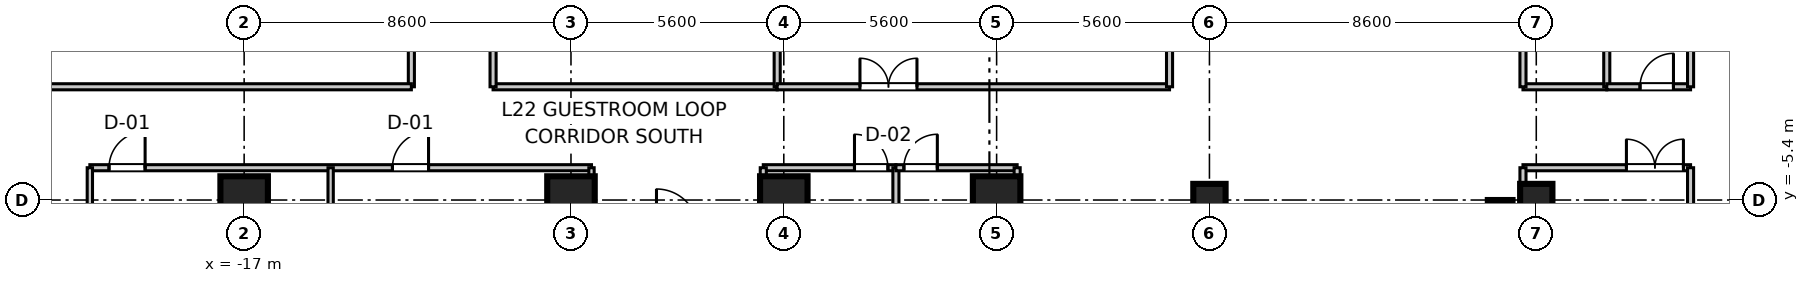
"""IFC4 building model, lengths in metres.
Left out: names, types, materials, properties, quantities, classifications, styles, units other than length and angle.
Written with IfcOpenShell. Run it as: python <this file> out.ifc"""

import sys

from ifc_helpers import new_model, si_unit, direction, frame, frame_2d, origin, origin_2d, place, context, subcontext, project, spatial, rectangle, extrude, source, transform, mapped, element, fill, save


model = new_model("IFC4")
c1 = context("Model", 3, precision=1e-05, world=origin(), true_north=direction((0.0, 1.0)))
c2 = subcontext(c1, "Body", "Model", "MODEL_VIEW")
j1 = project(units=[si_unit("LENGTHUNIT", "METRE"), si_unit("PLANEANGLEUNIT", "RADIAN")], contexts=[c1])
p1 = place(None, origin())
s1 = spatial("IfcSite", under=j1, at=p1, CompositionType="ELEMENT")
p2 = place(p1, origin())
s2 = spatial("IfcBuilding", under=s1, at=p2, CompositionType="ELEMENT")
p3 = place(p2, frame((0.0, 0.0, 91.95)))
s3 = spatial("IfcBuildingStorey", under=s2, at=p3, CompositionType="ELEMENT", Elevation=91.95)
m1 = source(origin(), c2, "Body", "SweptSolid", [
    extrude(rectangle(XDim=1.25, YDim=1.25, at=origin_2d()), origin(), (0.0, 0.0, 1.0), 3.605),
])
for number, where, z_axis, x_axis in (
    (1, (-17.0, -5.4, 0.0), (0.0, 0.0, 1.0), (1.0, 0.0, 0.0)),
    (2, (-8.4, -5.4, 0.0), (0.0, 0.0, 1.0), (1.0, 0.0, 0.0)),
    (3, (-2.8, -5.4, 0.0), (0.0, 0.0, 1.0), (1.0, 0.0, 0.0)),
    (4, (2.8, -5.4, 0.0), (0.0, 0.0, 1.0), (1.0, 0.0, 0.0)),
):
    element("IfcColumn", number, at=place(p3, frame(where, z_axis=z_axis, x_axis=x_axis)), inside=s3, PredefinedType="COLUMN", context=c2, shape_type="MappedRepresentation", body=[
        mapped(m1, transform((0.0, 0.0, 0.0), scale=1.0)),
    ])
m2 = source(origin(), c2, "Body", "SweptSolid", [
    extrude(rectangle(XDim=0.85, YDim=0.85, at=origin_2d()), origin(), (0.0, 0.0, 1.0), 3.605),
])
for number, where, z_axis, x_axis in (
    (5, (8.4, -5.4, 0.0), (0.0, 0.0, 1.0), (1.0, 0.0, 0.0)),
    (6, (17.0, -5.4, 0.0), (0.0, 0.0, 1.0), (1.0, 0.0, 0.0)),
):
    element("IfcColumn", number, at=place(p3, frame(where, z_axis=z_axis, x_axis=x_axis)), inside=s3, PredefinedType="PILASTER", context=c2, shape_type="MappedRepresentation", body=[
        mapped(m2, transform((0.0, 0.0, 0.0), scale=1.0)),
    ])
m3 = source(origin(), c2, "Body", "SweptSolid", [
    extrude(rectangle(XDim=11.6, YDim=0.65, at=frame_2d((5.8, 0.0))), origin(), (0.0, 0.0, 1.0), 3.38),
])
p4 = place(p3, frame((16.05, -17.0, 0.0), z_axis=(0.0, 0.0, 1.0), x_axis=(0.0, 1.0, 0.0)))
e7 = element("IfcWall", 7, at=p4, inside=s3, PredefinedType="SHEAR", context=c2, shape_type="MappedRepresentation", body=[
    mapped(m3, transform((0.0, 0.0, 0.0), scale=1.0)),
])
m4 = source(origin(), c2, "Body", "SweptSolid", [
    extrude(rectangle(XDim=4.41, YDim=0.16, at=frame_2d((2.205, 0.0))), origin(), (0.0, 0.0, 1.0), 2.72),
])
p5 = place(p3, frame((16.65, -4.55, 0.0), z_axis=(0.0, 0.0, 1.0), x_axis=(1.0, 0.0, 0.0)))
e8 = element("IfcWall", 8, at=p5, inside=s3, PredefinedType="PARTITIONING", context=c2, shape_type="MappedRepresentation", body=[
    mapped(m4, transform((0.0, 0.0, 0.0), scale=1.0)),
])
p6 = place(p5, frame((2.722, 0.0, 0.0)))
e9 = element("IfcOpeningElement", 9, at=p6, cuts=e8, PredefinedType="OPENING", context=c2, shape_type="SweptSolid", body=[
    extrude(rectangle(XDim=1.5, YDim=2.15, at=frame_2d((0.75, 1.075))), frame((0.0, 0.09, 0.0), z_axis=(0.0, -1.0, 0.0), x_axis=(1.0, 0.0, 0.0)), (0.0, 0.0, 1.0), 0.18),
])
m5 = source(origin(), c2, "Body", "SweptSolid", [
    extrude(rectangle(XDim=19.25, YDim=0.16, at=frame_2d((9.625, 0.0))), origin(), (0.0, 0.0, 1.0), 2.72),
])
p7 = place(p3, frame((16.65, -23.8, 0.0), z_axis=(0.0, 0.0, 1.0), x_axis=(0.0, 1.0, 0.0)))
e10 = element("IfcWall", 10, at=p7, inside=s3, PredefinedType="PARTITIONING", context=c2, shape_type="MappedRepresentation", body=[
    mapped(m5, transform((0.0, 0.0, 0.0), scale=1.0)),
])
m6 = source(origin(), c2, "Body", "SweptSolid", [
    extrude(rectangle(XDim=17.83, YDim=0.16, at=frame_2d((8.915, 0.0))), origin(), (0.0, 0.0, 1.0), 2.72),
])
p8 = place(p3, frame((21.06, -22.38, 0.0), z_axis=(0.0, 0.0, 1.0), x_axis=(0.0, 1.0, 0.0)))
e11 = element("IfcWall", 11, at=p8, inside=s3, PredefinedType="PARTITIONING", context=c2, shape_type="MappedRepresentation", body=[
    mapped(m6, transform((0.0, 0.0, 0.0), scale=1.0)),
])
m7 = source(origin(), c2, "Body", "SweptSolid", [
    extrude(rectangle(XDim=13.2, YDim=0.16, at=frame_2d((6.6, 0.0))), origin(), (0.0, 0.0, 1.0), 2.72),
])
p9 = place(p3, frame((-21.06, -4.55, 0.0), z_axis=(0.0, 0.0, 1.0), x_axis=(1.0, 0.0, 0.0)))
e12 = element("IfcWall", 12, at=p9, inside=s3, PredefinedType="PARTITIONING", context=c2, shape_type="MappedRepresentation", body=[
    mapped(m7, transform((0.0, 0.0, 0.0), scale=1.0)),
])
p10 = place(p9, frame((0.504, 0.0, 0.0)))
e13 = element("IfcOpeningElement", 13, at=p10, cuts=e12, PredefinedType="OPENING", context=c2, shape_type="SweptSolid", body=[
    extrude(rectangle(XDim=0.95, YDim=2.1, at=frame_2d((0.475, 1.05))), frame((0.0, 0.09, 0.0), z_axis=(0.0, -1.0, 0.0), x_axis=(1.0, 0.0, 0.0)), (0.0, 0.0, 1.0), 0.18),
])
p11 = place(p9, frame((7.962, 0.0, 0.0)))
e14 = element("IfcOpeningElement", 14, at=p11, cuts=e12, PredefinedType="OPENING", context=c2, shape_type="SweptSolid", body=[
    extrude(rectangle(XDim=0.95, YDim=2.1, at=frame_2d((0.475, 1.05))), frame((0.0, 0.09, 0.0), z_axis=(0.0, -1.0, 0.0), x_axis=(1.0, 0.0, 0.0)), (0.0, 0.0, 1.0), 0.18),
])
m8 = source(origin(), c2, "Body", "SweptSolid", [
    extrude(rectangle(XDim=17.83, YDim=0.14, at=frame_2d((8.915, 0.0))), origin(), (0.0, 0.0, 1.0), 2.72),
])
p12 = place(p3, frame((-21.06, -22.38, 0.0), z_axis=(0.0, 0.0, 1.0), x_axis=(0.0, 1.0, 0.0)))
e15 = element("IfcWall", 15, at=p12, inside=s3, PredefinedType="PARTITIONING", context=c2, shape_type="MappedRepresentation", body=[
    mapped(m8, transform((0.0, 0.0, 0.0), scale=1.0)),
])
m9 = source(origin(), c2, "Body", "SweptSolid", [
    extrude(rectangle(XDim=19.25, YDim=0.14, at=frame_2d((9.625, 0.0))), origin(), (0.0, 0.0, 1.0), 2.72),
])
for number, where, z_axis, x_axis in (
    (16, (-7.86, -23.8, 0.0), (0.0, 0.0, 1.0), (0.0, 1.0, 0.0)),
    (17, (-14.724, -23.8, 0.0), (0.0, 0.0, 1.0), (0.0, 1.0, 0.0)),
):
    element("IfcWall", number, at=place(p3, frame(where, z_axis=z_axis, x_axis=x_axis)), inside=s3, PredefinedType="PARTITIONING", context=c2, shape_type="MappedRepresentation", body=[
        mapped(m9, transform((0.0, 0.0, 0.0), scale=1.0)),
    ])
m10 = source(origin(), c2, "Body", "SweptSolid", [
    extrude(rectangle(XDim=3.49, YDim=0.16, at=frame_2d((1.745, 0.0))), origin(), (0.0, 0.0, 1.0), 2.72),
])
p13 = place(p3, frame((-3.34, -4.55, 0.0), z_axis=(0.0, 0.0, 1.0), x_axis=(1.0, 0.0, 0.0)))
e18 = element("IfcWall", 18, at=p13, inside=s3, PredefinedType="PARTITIONING", context=c2, shape_type="MappedRepresentation", body=[
    mapped(m10, transform((0.0, 0.0, 0.0), scale=1.0)),
])
p14 = place(p13, frame((2.4, 0.0, 0.0)))
e19 = element("IfcOpeningElement", 19, at=p14, cuts=e18, PredefinedType="OPENING", context=c2, shape_type="SweptSolid", body=[
    extrude(rectangle(XDim=0.88, YDim=2.1, at=frame_2d((0.44, 1.05))), frame((0.0, 0.09, 0.0), z_axis=(0.0, -1.0, 0.0), x_axis=(1.0, 0.0, 0.0)), (0.0, 0.0, 1.0), 0.18),
])
for number, where, z_axis, x_axis in (
    (20, (-3.34, -23.8, 0.0), (0.0, 0.0, 1.0), (0.0, 1.0, 0.0)),
    (21, (0.15, -23.8, 0.0), (0.0, 0.0, 1.0), (0.0, 1.0, 0.0)),
):
    element("IfcWall", number, at=place(p3, frame(where, z_axis=z_axis, x_axis=x_axis)), inside=s3, PredefinedType="PARTITIONING", context=c2, shape_type="MappedRepresentation", body=[
        mapped(m5, transform((0.0, 0.0, 0.0), scale=1.0)),
    ])
m11 = source(origin(), c2, "Body", "SweptSolid", [
    extrude(rectangle(XDim=3.19, YDim=0.16, at=frame_2d((1.595, 0.0))), origin(), (0.0, 0.0, 1.0), 2.72),
])
p15 = place(p3, frame((0.15, -4.55, 0.0), z_axis=(0.0, 0.0, 1.0), x_axis=(1.0, 0.0, 0.0)))
e22 = element("IfcWall", 22, at=p15, inside=s3, PredefinedType="PARTITIONING", context=c2, shape_type="MappedRepresentation", body=[
    mapped(m11, transform((0.0, 0.0, 0.0), scale=1.0)),
])
p16 = place(p15, frame((0.21, 0.0, 0.0)))
e23 = element("IfcOpeningElement", 23, at=p16, cuts=e22, PredefinedType="OPENING", context=c2, shape_type="SweptSolid", body=[
    extrude(rectangle(XDim=0.88, YDim=2.1, at=frame_2d((0.44, 1.05))), frame((0.0, 0.09, 0.0), z_axis=(0.0, -1.0, 0.0), x_axis=(1.0, 0.0, 0.0)), (0.0, 0.0, 1.0), 0.18),
])
p17 = place(p3, frame((3.34, -23.8, 0.0), z_axis=(0.0, 0.0, 1.0), x_axis=(0.0, 1.0, 0.0)))
e24 = element("IfcWall", 24, at=p17, inside=s3, PredefinedType="PARTITIONING", context=c2, shape_type="MappedRepresentation", body=[
    mapped(m5, transform((0.0, 0.0, 0.0), scale=1.0)),
])
m12 = source(origin(), c2, "Body", "SweptSolid", [
    extrude(rectangle(XDim=4.84, YDim=0.16, at=frame_2d((2.42, 0.0))), origin(), (0.0, 0.0, 1.0), 2.72),
])
p18 = place(p3, frame((-12.6, -2.42, 0.0), z_axis=(0.0, 0.0, 1.0), x_axis=(0.0, 1.0, 0.0)))
e25 = element("IfcWall", 25, at=p18, inside=s3, PredefinedType="PARTITIONING", context=c2, shape_type="MappedRepresentation", body=[
    mapped(m12, transform((0.0, 0.0, 0.0), scale=1.0)),
])
m13 = source(origin(), c2, "Body", "SweptSolid", [
    extrude(rectangle(XDim=11.2, YDim=0.16, at=frame_2d((5.6, 0.0))), origin(), (0.0, 0.0, 1.0), 2.72),
])
p19 = place(p3, frame((-23.8, -2.42, 0.0), z_axis=(0.0, 0.0, 1.0), x_axis=(1.0, 0.0, 0.0)))
e26 = element("IfcWall", 26, at=p19, inside=s3, PredefinedType="PARTITIONING", context=c2, shape_type="MappedRepresentation", body=[
    mapped(m13, transform((0.0, 0.0, 0.0), scale=1.0)),
])
m14 = source(origin(), c2, "Body", "SweptSolid", [
    extrude(rectangle(XDim=7.476, YDim=0.16, at=frame_2d((3.738, 0.0))), origin(), (0.0, 0.0, 1.0), 2.72),
])
p20 = place(p3, frame((-10.45, -2.42, 0.0), z_axis=(0.0, 0.0, 1.0), x_axis=(1.0, 0.0, 0.0)))
e27 = element("IfcWall", 27, at=p20, inside=s3, PredefinedType="PARTITIONING", context=c2, shape_type="MappedRepresentation", body=[
    mapped(m14, transform((0.0, 0.0, 0.0), scale=1.0)),
])
for number, where, z_axis, x_axis in (
    (28, (-10.45, -2.42, 0.0), (0.0, 0.0, 1.0), (0.0, 1.0, 0.0)),
    (29, (-2.974, -2.42, 0.0), (0.0, 0.0, 1.0), (0.0, 1.0, 0.0)),
):
    element("IfcWall", number, at=place(p3, frame(where, z_axis=z_axis, x_axis=x_axis)), inside=s3, PredefinedType="PARTITIONING", context=c2, shape_type="MappedRepresentation", body=[
        mapped(m12, transform((0.0, 0.0, 0.0), scale=1.0)),
    ])
m15 = source(origin(), c2, "Body", "SweptSolid", [
    extrude(rectangle(XDim=10.324, YDim=0.16, at=frame_2d((5.162, 0.0))), origin(), (0.0, 0.0, 1.0), 2.72),
])
p21 = place(p3, frame((-2.974, -2.42, 0.0), z_axis=(0.0, 0.0, 1.0), x_axis=(1.0, 0.0, 0.0)))
e30 = element("IfcWall", 30, at=p21, inside=s3, PredefinedType="PARTITIONING", context=c2, shape_type="MappedRepresentation", body=[
    mapped(m15, transform((0.0, 0.0, 0.0), scale=1.0)),
])
p22 = place(p21, frame((2.178, 0.0, 0.0)))
e31 = element("IfcOpeningElement", 31, at=p22, cuts=e30, PredefinedType="OPENING", context=c2, shape_type="SweptSolid", body=[
    extrude(rectangle(XDim=1.5, YDim=2.15, at=frame_2d((0.75, 1.075))), frame((0.0, 0.09, 0.0), z_axis=(0.0, -1.0, 0.0), x_axis=(1.0, 0.0, 0.0)), (0.0, 0.0, 1.0), 0.18),
])
p23 = place(p3, frame((7.35, -2.42, 0.0), z_axis=(0.0, 0.0, 1.0), x_axis=(0.0, 1.0, 0.0)))
e32 = element("IfcWall", 32, at=p23, inside=s3, PredefinedType="PARTITIONING", context=c2, shape_type="MappedRepresentation", body=[
    mapped(m12, transform((0.0, 0.0, 0.0), scale=1.0)),
])
m16 = source(origin(), c2, "Body", "SweptSolid", [
    extrude(rectangle(XDim=2.205, YDim=0.16, at=frame_2d((1.103, 0.0))), origin(), (0.0, 0.0, 1.0), 2.72),
])
p24 = place(p3, frame((16.65, -2.42, 0.0), z_axis=(0.0, 0.0, 1.0), x_axis=(1.0, 0.0, 0.0)))
e33 = element("IfcWall", 33, at=p24, inside=s3, PredefinedType="PARTITIONING", context=c2, shape_type="MappedRepresentation", body=[
    mapped(m16, transform((0.0, 0.0, 0.0), scale=1.0)),
])
for number, where, z_axis, x_axis in (
    (34, (16.65, -2.42, 0.0), (0.0, 0.0, 1.0), (0.0, 1.0, 0.0)),
    (35, (18.855, -2.42, 0.0), (0.0, 0.0, 1.0), (0.0, 1.0, 0.0)),
):
    element("IfcWall", number, at=place(p3, frame(where, z_axis=z_axis, x_axis=x_axis)), inside=s3, PredefinedType="PARTITIONING", context=c2, shape_type="MappedRepresentation", body=[
        mapped(m12, transform((0.0, 0.0, 0.0), scale=1.0)),
    ])
p25 = place(p3, frame((18.855, -2.42, 0.0), z_axis=(0.0, 0.0, 1.0), x_axis=(1.0, 0.0, 0.0)))
e36 = element("IfcWall", 36, at=p25, inside=s3, PredefinedType="PARTITIONING", context=c2, shape_type="MappedRepresentation", body=[
    mapped(m16, transform((0.0, 0.0, 0.0), scale=1.0)),
])
p26 = place(p25, frame((0.875, 0.0, 0.0)))
e37 = element("IfcOpeningElement", 37, at=p26, cuts=e36, PredefinedType="OPENING", context=c2, shape_type="SweptSolid", body=[
    extrude(rectangle(XDim=0.88, YDim=2.1, at=frame_2d((0.44, 1.05))), frame((0.0, 0.09, 0.0), z_axis=(0.0, -1.0, 0.0), x_axis=(1.0, 0.0, 0.0)), (0.0, 0.0, 1.0), 0.18),
])
p27 = place(p3, frame((21.06, -2.42, 0.0), z_axis=(0.0, 0.0, 1.0), x_axis=(0.0, 1.0, 0.0)))
e38 = element("IfcWall", 38, at=p27, inside=s3, PredefinedType="PARTITIONING", context=c2, shape_type="MappedRepresentation", body=[
    mapped(m12, transform((0.0, 0.0, 0.0), scale=1.0)),
])
m17 = source(origin(), c2, "Body", "SweptSolid", [
    extrude(rectangle(XDim=1.5, YDim=2.15, at=frame_2d((0.75, 1.075))), frame((0.0, 0.025, 0.0), z_axis=(0.0, -1.0, 0.0), x_axis=(1.0, 0.0, 0.0)), (0.0, 0.0, 1.0), 0.05),
])
p28 = place(p6, frame((1.5, 0.0, 0.0), z_axis=(0.0, 0.0, 1.0), x_axis=(-1.0, 0.0, 0.0)))
e39 = element("IfcDoor", 39, at=p28, inside=s3, OperationType="DOUBLE_DOOR_SINGLE_SWING", PredefinedType="DOOR", context=c2, shape_type="MappedRepresentation", body=[
    mapped(m17, transform((0.0, 0.0, 0.0), scale=1.0)),
])
fill(e9, e39)
m18 = source(origin(), c2, "Body", "SweptSolid", [
    extrude(rectangle(XDim=0.95, YDim=2.1, at=frame_2d((0.475, 1.05))), frame((0.0, 0.025, 0.0), z_axis=(0.0, -1.0, 0.0), x_axis=(1.0, 0.0, 0.0)), (0.0, 0.0, 1.0), 0.05),
])
p29 = place(p10, frame((0.95, 0.0, 0.0), z_axis=(0.0, 0.0, 1.0), x_axis=(-1.0, 0.0, 0.0)))
e40 = element("IfcDoor", 40, at=p29, inside=s3, OperationType="SINGLE_SWING_RIGHT", PredefinedType="DOOR", context=c2, shape_type="MappedRepresentation", body=[
    mapped(m18, transform((0.0, 0.0, 0.0), scale=1.0)),
])
fill(e13, e40)
p30 = place(p11, frame((0.95, 0.0, 0.0), z_axis=(0.0, 0.0, 1.0), x_axis=(-1.0, 0.0, 0.0)))
e41 = element("IfcDoor", 41, at=p30, inside=s3, OperationType="SINGLE_SWING_RIGHT", PredefinedType="DOOR", context=c2, shape_type="MappedRepresentation", body=[
    mapped(m18, transform((0.0, 0.0, 0.0), scale=1.0)),
])
fill(e14, e41)
m19 = source(origin(), c2, "Body", "SweptSolid", [
    extrude(rectangle(XDim=0.88, YDim=2.1, at=frame_2d((0.44, 1.05))), frame((0.0, 0.025, 0.0), z_axis=(0.0, -1.0, 0.0), x_axis=(1.0, 0.0, 0.0)), (0.0, 0.0, 1.0), 0.05),
])
p31 = place(p14, frame((0.88, 0.0, 0.0), z_axis=(0.0, 0.0, 1.0), x_axis=(-1.0, 0.0, 0.0)))
e42 = element("IfcDoor", 42, at=p31, inside=s3, OperationType="SINGLE_SWING_LEFT", PredefinedType="DOOR", context=c2, shape_type="MappedRepresentation", body=[
    mapped(m19, transform((0.0, 0.0, 0.0), scale=1.0)),
])
fill(e19, e42)
p32 = place(p16, frame((0.88, 0.0, 0.0), z_axis=(0.0, 0.0, 1.0), x_axis=(-1.0, 0.0, 0.0)))
e43 = element("IfcDoor", 43, at=p32, inside=s3, OperationType="SINGLE_SWING_RIGHT", PredefinedType="DOOR", context=c2, shape_type="MappedRepresentation", body=[
    mapped(m19, transform((0.0, 0.0, 0.0), scale=1.0)),
])
fill(e23, e43)
p33 = place(p22, origin())
e44 = element("IfcDoor", 44, at=p33, inside=s3, OperationType="DOUBLE_DOOR_SINGLE_SWING", PredefinedType="DOOR", context=c2, shape_type="MappedRepresentation", body=[
    mapped(m17, transform((0.0, 0.0, 0.0), scale=1.0)),
])
fill(e31, e44)
p34 = place(p26, origin())
e45 = element("IfcDoor", 45, at=p34, inside=s3, OperationType="SINGLE_SWING_RIGHT", PredefinedType="DOOR", context=c2, shape_type="MappedRepresentation", body=[
    mapped(m19, transform((0.0, 0.0, 0.0), scale=1.0)),
])
fill(e37, e45)
save(model, sys.argv[1])
